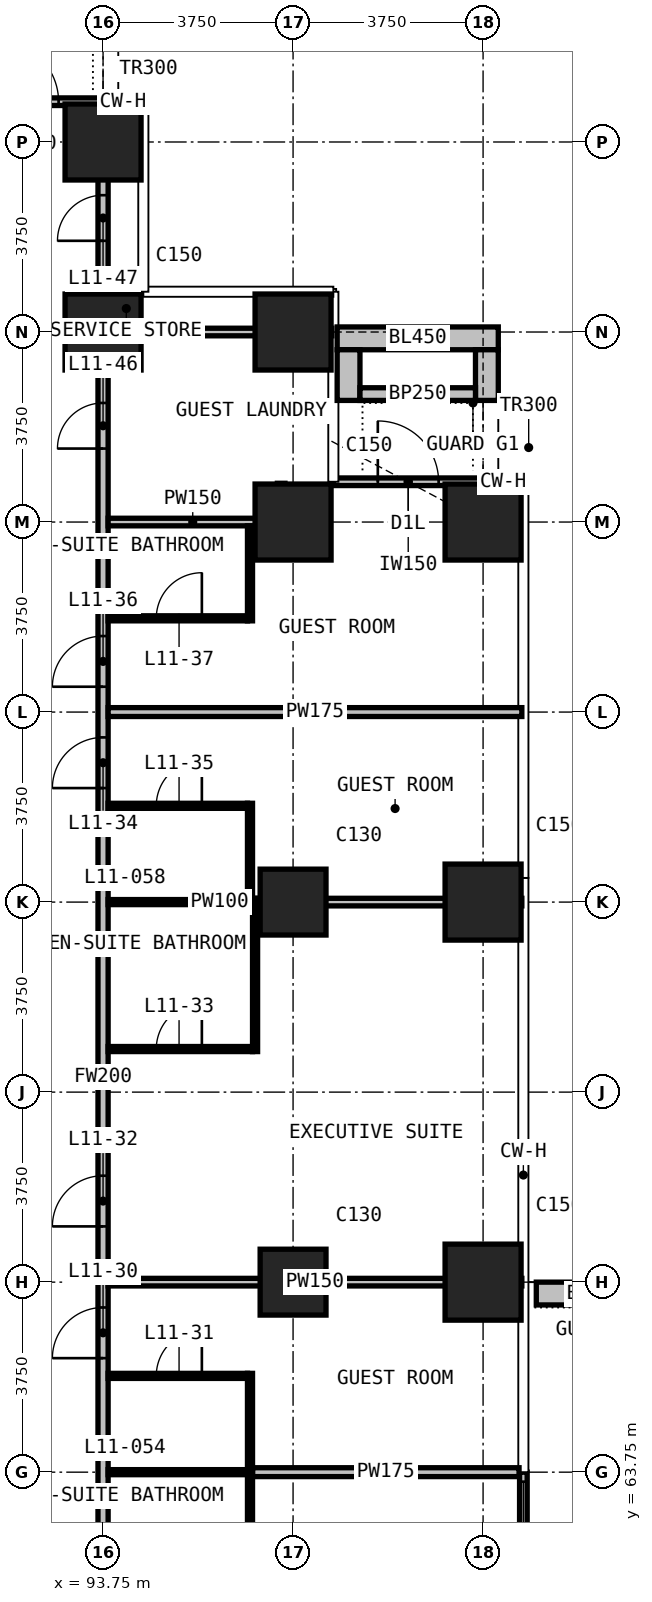
"""IFC4 building model, lengths in metres.
Left out: names, types, materials, properties, quantities, classifications, styles, units other than length and angle.
Written with IfcOpenShell. Run it as: python <this file> out.ifc"""

import sys

from ifc_helpers import new_model, si_unit, direction, frame, frame_2d, origin, origin_2d, place, context, subcontext, project, spatial, rectangle, extrude, element, fill, save


model = new_model("IFC4")
c1 = context("Model", 3, precision=1e-05, world=origin(), true_north=direction((0.0, 1.0)))
c2 = subcontext(c1, "Body", "Model", "MODEL_VIEW")
j1 = project(units=[si_unit("LENGTHUNIT", "METRE"), si_unit("PLANEANGLEUNIT", "RADIAN")], contexts=[c1])
p1 = place(None, origin())
s1 = spatial("IfcSite", under=j1, at=p1, CompositionType="ELEMENT")
p2 = place(p1, origin())
s2 = spatial("IfcBuilding", under=s1, at=p2, CompositionType="ELEMENT")
p3 = place(p2, frame((0.0, 0.0, 56.0)))
s3 = spatial("IfcBuildingStorey", under=s2, at=p3, CompositionType="ELEMENT", Elevation=56.0)
for number, where, z_axis, x_axis in (
    (1, (93.75, 86.25, 0.0), (0.0, 0.0, 1.0), (1.0, 0.0, 0.0)),
    (2, (93.75, 90.0, 0.0), (0.0, 0.0, 1.0), (1.0, 0.0, 0.0)),
):
    element("IfcColumn", number, at=place(p3, frame(where, z_axis=z_axis, x_axis=x_axis)), inside=s3, PredefinedType="COLUMN", context=c2, shape_type="SweptSolid", body=[
        extrude(rectangle(XDim=1.5, YDim=1.5, at=origin_2d()), origin(), (0.0, 0.0, 1.0), 3.3),
    ])
for number, where, z_axis, x_axis in (
    (3, (97.5, 67.5, 0.0), (0.0, 0.0, 1.0), (1.0, 0.0, 0.0)),
    (4, (97.5, 75.0, 0.0), (0.0, 0.0, 1.0), (1.0, 0.0, 0.0)),
):
    element("IfcColumn", number, at=place(p3, frame(where, z_axis=z_axis, x_axis=x_axis)), inside=s3, PredefinedType="COLUMN", context=c2, shape_type="SweptSolid", body=[
        extrude(rectangle(XDim=1.3, YDim=1.3, at=origin_2d()), origin(), (0.0, 0.0, 1.0), 3.3),
    ])
for number, where, z_axis, x_axis in (
    (5, (97.5, 82.5, 0.0), (0.0, 0.0, 1.0), (1.0, 0.0, 0.0)),
    (6, (97.5, 86.25, 0.0), (0.0, 0.0, 1.0), (1.0, 0.0, 0.0)),
    (7, (101.25, 67.5, 0.0), (0.0, 0.0, 1.0), (1.0, 0.0, 0.0)),
    (8, (101.25, 75.0, 0.0), (0.0, 0.0, 1.0), (1.0, 0.0, 0.0)),
    (9, (101.25, 82.5, 0.0), (0.0, 0.0, 1.0), (1.0, 0.0, 0.0)),
):
    element("IfcColumn", number, at=place(p3, frame(where, z_axis=z_axis, x_axis=x_axis)), inside=s3, PredefinedType="COLUMN", context=c2, shape_type="SweptSolid", body=[
        extrude(rectangle(XDim=1.5, YDim=1.5, at=origin_2d()), origin(), (0.0, 0.0, 1.0), 3.3),
    ])
p4 = place(p3, frame((102.045, 60.0, 0.0), z_axis=(0.0, 0.0, 1.0), x_axis=(0.0, 1.0, 0.0)))
e10 = element("IfcWall", 10, at=p4, inside=s3, PredefinedType="SOLIDWALL", context=c2, shape_type="SweptSolid", body=[
    extrude(rectangle(XDim=3.75, YDim=0.15, at=frame_2d((1.875, 0.0))), origin(), (0.0, 0.0, 1.0), 3.0),
])
p5 = place(p4, frame((1.275, 0.0, 0.0)))
e11 = element("IfcOpeningElement", 11, at=p5, cuts=e10, PredefinedType="OPENING", context=c2, shape_type="SweptSolid", body=[
    extrude(rectangle(XDim=1.2, YDim=2.4, at=frame_2d((0.6, 1.2))), frame((0.0, 0.085, 0.0), z_axis=(0.0, -1.0, 0.0), x_axis=(1.0, 0.0, 0.0)), (0.0, 0.0, 1.0), 0.17),
])
p6 = place(p4, frame((2.663, 0.0, 0.1)))
e12 = element("IfcOpeningElement", 12, at=p6, cuts=e10, PredefinedType="OPENING", context=c2, shape_type="SweptSolid", body=[
    extrude(rectangle(XDim=0.9, YDim=2.4, at=frame_2d((0.45, 1.2))), frame((0.0, 0.085, 0.0), z_axis=(0.0, -1.0, 0.0), x_axis=(1.0, 0.0, 0.0)), (0.0, 0.0, 1.0), 0.17),
])
p7 = place(p3, frame((98.295, 83.295, 0.0), z_axis=(0.0, 0.0, 1.0), x_axis=(1.0, 0.0, 0.0)))
e13 = element("IfcWall", 13, at=p7, inside=s3, PredefinedType="SOLIDWALL", context=c2, shape_type="SweptSolid", body=[
    extrude(rectangle(XDim=2.955, YDim=0.15, at=frame_2d((1.478, 0.0))), origin(), (0.0, 0.0, 1.0), 3.0),
])
p8 = place(p7, frame((0.877, 0.0, 0.0)))
e14 = element("IfcOpeningElement", 14, at=p8, cuts=e13, PredefinedType="OPENING", context=c2, shape_type="SweptSolid", body=[
    extrude(rectangle(XDim=1.2, YDim=2.0, at=frame_2d((0.6, 1.0))), frame((0.0, 0.085, 0.0), z_axis=(0.0, -1.0, 0.0), x_axis=(1.0, 0.0, 0.0)), (0.0, 0.0, 1.0), 0.17),
])
p9 = place(p3, frame((90.795, 90.795, 0.0), z_axis=(0.0, 0.0, 1.0), x_axis=(1.0, 0.0, 0.0)))
e15 = element("IfcWall", 15, at=p9, inside=s3, PredefinedType="SOLIDWALL", context=c2, shape_type="SweptSolid", body=[
    extrude(rectangle(XDim=2.955, YDim=0.15, at=frame_2d((1.478, 0.0))), origin(), (0.0, 0.0, 1.0), 3.0),
])
p10 = place(p9, frame((0.877, 0.0, 0.0)))
e16 = element("IfcOpeningElement", 16, at=p10, cuts=e15, PredefinedType="OPENING", context=c2, shape_type="SweptSolid", body=[
    extrude(rectangle(XDim=1.2, YDim=2.4, at=frame_2d((0.6, 1.2))), frame((0.0, 0.085, 0.0), z_axis=(0.0, -1.0, 0.0), x_axis=(1.0, 0.0, 0.0)), (0.0, 0.0, 1.0), 0.17),
])
p11 = place(p3, frame((102.3, 67.275, 0.0), z_axis=(0.0, 0.0, 1.0), x_axis=(1.0, 0.0, 0.0)))
e17 = element("IfcWall", 17, at=p11, inside=s3, PredefinedType="USERDEFINED", context=c2, shape_type="SweptSolid", body=[
    extrude(rectangle(XDim=2.35, YDim=0.45, at=frame_2d((1.175, 0.0))), origin(), (0.0, 0.0, 1.0), 1.1),
])
p12 = place(p3, frame((98.37, 86.125, 0.0), z_axis=(0.0, 0.0, 1.0), x_axis=(1.0, 0.0, 0.0)))
e18 = element("IfcWall", 18, at=p12, inside=s3, PredefinedType="USERDEFINED", context=c2, shape_type="SweptSolid", body=[
    extrude(rectangle(XDim=3.18, YDim=0.45, at=frame_2d((1.59, 0.0))), origin(), (0.0, 0.0, 1.0), 1.1),
])
for number, where, z_axis, x_axis in (
    (19, (98.595, 84.9, 0.0), (0.0, 0.0, 1.0), (0.0, 1.0, 0.0)),
    (20, (101.325, 84.9, 0.0), (0.0, 0.0, 1.0), (0.0, 1.0, 0.0)),
):
    element("IfcWall", number, at=place(p3, frame(where, z_axis=z_axis, x_axis=x_axis)), inside=s3, PredefinedType="USERDEFINED", context=c2, shape_type="SweptSolid", body=[
        extrude(rectangle(XDim=1.0, YDim=0.45, at=frame_2d((0.5, 0.0))), origin(), (0.0, 0.0, 1.0), 1.1),
    ])
p13 = place(p3, frame((98.82, 85.025, 0.0), z_axis=(0.0, 0.0, 1.0), x_axis=(1.0, 0.0, 0.0)))
e21 = element("IfcWall", 21, at=p13, inside=s3, PredefinedType="USERDEFINED", context=c2, shape_type="SweptSolid", body=[
    extrude(rectangle(XDim=2.28, YDim=0.25, at=frame_2d((1.14, 0.0))), origin(), (0.0, 0.0, 1.0), 1.0),
])
p14 = place(p3, frame((93.75, 52.4, 0.0), z_axis=(0.0, 0.0, 1.0), x_axis=(0.0, 1.0, 0.0)))
e22 = element("IfcWall", 22, at=p14, inside=s3, PredefinedType="PARTITIONING", context=c2, shape_type="SweptSolid", body=[
    extrude(rectangle(XDim=38.31, YDim=0.2, at=frame_2d((19.155, 0.0))), origin(), (0.0, 0.0, 1.0), 3.0),
])
p15 = place(p14, frame((5.5, 0.0, 0.0)))
e23 = element("IfcOpeningElement", 23, at=p15, cuts=e22, PredefinedType="OPENING", context=c2, shape_type="SweptSolid", body=[
    extrude(rectangle(XDim=1.0, YDim=2.2, at=frame_2d((0.5, 1.1))), frame((0.0, 0.11, 0.0), z_axis=(0.0, -1.0, 0.0), x_axis=(1.0, 0.0, 0.0)), (0.0, 0.0, 1.0), 0.22),
])
p16 = place(p14, frame((8.1, 0.0, 0.0)))
e24 = element("IfcOpeningElement", 24, at=p16, cuts=e22, PredefinedType="OPENING", context=c2, shape_type="SweptSolid", body=[
    extrude(rectangle(XDim=1.0, YDim=2.2, at=frame_2d((0.5, 1.1))), frame((0.0, 0.11, 0.0), z_axis=(0.0, -1.0, 0.0), x_axis=(1.0, 0.0, 0.0)), (0.0, 0.0, 1.0), 0.22),
])
p17 = place(p14, frame((13.6, 0.0, 0.0)))
e25 = element("IfcOpeningElement", 25, at=p17, cuts=e22, PredefinedType="OPENING", context=c2, shape_type="SweptSolid", body=[
    extrude(rectangle(XDim=1.0, YDim=2.2, at=frame_2d((0.5, 1.1))), frame((0.0, 0.11, 0.0), z_axis=(0.0, -1.0, 0.0), x_axis=(1.0, 0.0, 0.0)), (0.0, 0.0, 1.0), 0.22),
])
p18 = place(p14, frame((16.2, 0.0, 0.0)))
e26 = element("IfcOpeningElement", 26, at=p18, cuts=e22, PredefinedType="OPENING", context=c2, shape_type="SweptSolid", body=[
    extrude(rectangle(XDim=1.0, YDim=2.2, at=frame_2d((0.5, 1.1))), frame((0.0, 0.11, 0.0), z_axis=(0.0, -1.0, 0.0), x_axis=(1.0, 0.0, 0.0)), (0.0, 0.0, 1.0), 0.22),
])
p19 = place(p14, frame((24.85, 0.0, 0.0)))
e27 = element("IfcOpeningElement", 27, at=p19, cuts=e22, PredefinedType="OPENING", context=c2, shape_type="SweptSolid", body=[
    extrude(rectangle(XDim=1.0, YDim=2.2, at=frame_2d((0.5, 1.1))), frame((0.0, 0.11, 0.0), z_axis=(0.0, -1.0, 0.0), x_axis=(1.0, 0.0, 0.0)), (0.0, 0.0, 1.0), 0.22),
])
p20 = place(p14, frame((26.85, 0.0, 0.0)))
e28 = element("IfcOpeningElement", 28, at=p20, cuts=e22, PredefinedType="OPENING", context=c2, shape_type="SweptSolid", body=[
    extrude(rectangle(XDim=1.0, YDim=2.2, at=frame_2d((0.5, 1.1))), frame((0.0, 0.11, 0.0), z_axis=(0.0, -1.0, 0.0), x_axis=(1.0, 0.0, 0.0)), (0.0, 0.0, 1.0), 0.22),
])
p21 = place(p14, frame((31.55, 0.0, 0.0)))
e29 = element("IfcOpeningElement", 29, at=p21, cuts=e22, PredefinedType="OPENING", context=c2, shape_type="SweptSolid", body=[
    extrude(rectangle(XDim=0.9, YDim=2.2, at=frame_2d((0.45, 1.1))), frame((0.0, 0.11, 0.0), z_axis=(0.0, -1.0, 0.0), x_axis=(1.0, 0.0, 0.0)), (0.0, 0.0, 1.0), 0.22),
])
p22 = place(p14, frame((35.65, 0.0, 0.0)))
e30 = element("IfcOpeningElement", 30, at=p22, cuts=e22, PredefinedType="OPENING", context=c2, shape_type="SweptSolid", body=[
    extrude(rectangle(XDim=0.9, YDim=2.2, at=frame_2d((0.45, 1.1))), frame((0.0, 0.11, 0.0), z_axis=(0.0, -1.0, 0.0), x_axis=(1.0, 0.0, 0.0)), (0.0, 0.0, 1.0), 0.22),
])
p23 = place(p3, frame((96.7, 63.75, 0.0), z_axis=(0.0, 0.0, 1.0), x_axis=(1.0, 0.0, 0.0)))
e31 = element("IfcWall", 31, at=p23, inside=s3, PredefinedType="PARTITIONING", context=c2, shape_type="SweptSolid", body=[
    extrude(rectangle(XDim=5.26, YDim=0.175, at=frame_2d((2.63, 0.0))), origin(), (0.0, 0.0, 1.0), 3.0),
])
p24 = place(p3, frame((93.85, 78.75, 0.0), z_axis=(0.0, 0.0, 1.0), x_axis=(1.0, 0.0, 0.0)))
e32 = element("IfcWall", 32, at=p24, inside=s3, PredefinedType="PARTITIONING", context=c2, shape_type="SweptSolid", body=[
    extrude(rectangle(XDim=8.165, YDim=0.175, at=frame_2d((4.083, 0.0))), origin(), (0.0, 0.0, 1.0), 3.0),
])
p25 = place(p3, frame((93.85, 67.5, 0.0), z_axis=(0.0, 0.0, 1.0), x_axis=(1.0, 0.0, 0.0)))
e33 = element("IfcWall", 33, at=p25, inside=s3, PredefinedType="PARTITIONING", context=c2, shape_type="SweptSolid", body=[
    extrude(rectangle(XDim=8.165, YDim=0.15, at=frame_2d((4.083, 0.0))), origin(), (0.0, 0.0, 1.0), 3.0),
])
p26 = place(p3, frame((96.8, 75.0, 0.0), z_axis=(0.0, 0.0, 1.0), x_axis=(1.0, 0.0, 0.0)))
e34 = element("IfcWall", 34, at=p26, inside=s3, PredefinedType="PARTITIONING", context=c2, shape_type="SweptSolid", body=[
    extrude(rectangle(XDim=5.215, YDim=0.15, at=frame_2d((2.607, 0.0))), origin(), (0.0, 0.0, 1.0), 3.0),
])
p27 = place(p3, frame((93.85, 82.5, 0.0), z_axis=(0.0, 0.0, 1.0), x_axis=(1.0, 0.0, 0.0)))
e35 = element("IfcWall", 35, at=p27, inside=s3, PredefinedType="PARTITIONING", context=c2, shape_type="SweptSolid", body=[
    extrude(rectangle(XDim=3.34, YDim=0.15, at=frame_2d((1.67, 0.0))), origin(), (0.0, 0.0, 1.0), 3.0),
])
p28 = place(p3, frame((93.85, 86.25, 0.0), z_axis=(0.0, 0.0, 1.0), x_axis=(1.0, 0.0, 0.0)))
e36 = element("IfcWall", 36, at=p28, inside=s3, PredefinedType="PARTITIONING", context=c2, shape_type="SweptSolid", body=[
    extrude(rectangle(XDim=4.415, YDim=0.15, at=frame_2d((2.208, 0.0))), origin(), (0.0, 0.0, 1.0), 3.0),
])
p29 = place(p3, frame((97.265, 82.425, 0.0), z_axis=(0.0, 0.0, 1.0), x_axis=(0.0, 1.0, 0.0)))
e37 = element("IfcWall", 37, at=p29, inside=s3, PredefinedType="PARTITIONING", context=c2, shape_type="SweptSolid", body=[
    extrude(rectangle(XDim=0.84, YDim=0.15, at=frame_2d((0.42, 0.0))), origin(), (0.0, 0.0, 1.0), 3.0),
])
p30 = place(p3, frame((93.85, 63.75, 0.0), z_axis=(0.0, 0.0, 1.0), x_axis=(1.0, 0.0, 0.0)))
e38 = element("IfcWall", 38, at=p30, inside=s3, PredefinedType="PARTITIONING", context=c2, shape_type="SweptSolid", body=[
    extrude(rectangle(XDim=2.75, YDim=0.1, at=frame_2d((1.375, 0.0))), origin(), (0.0, 0.0, 1.0), 3.0),
])
p31 = place(p3, frame((93.85, 65.65, 0.0), z_axis=(0.0, 0.0, 1.0), x_axis=(1.0, 0.0, 0.0)))
e39 = element("IfcWall", 39, at=p31, inside=s3, PredefinedType="PARTITIONING", context=c2, shape_type="SweptSolid", body=[
    extrude(rectangle(XDim=2.75, YDim=0.1, at=frame_2d((1.375, 0.0))), origin(), (0.0, 0.0, 1.0), 3.0),
])
p32 = place(p31, frame((0.95, 0.0, 0.0)))
e40 = element("IfcOpeningElement", 40, at=p32, cuts=e39, PredefinedType="OPENING", context=c2, shape_type="SweptSolid", body=[
    extrude(rectangle(XDim=0.9, YDim=2.2, at=frame_2d((0.45, 1.1))), frame((0.0, 0.06, 0.0), z_axis=(0.0, -1.0, 0.0), x_axis=(1.0, 0.0, 0.0)), (0.0, 0.0, 1.0), 0.12),
])
p33 = place(p3, frame((93.85, 72.1, 0.0), z_axis=(0.0, 0.0, 1.0), x_axis=(1.0, 0.0, 0.0)))
e41 = element("IfcWall", 41, at=p33, inside=s3, PredefinedType="PARTITIONING", context=c2, shape_type="SweptSolid", body=[
    extrude(rectangle(XDim=2.85, YDim=0.1, at=frame_2d((1.425, 0.0))), origin(), (0.0, 0.0, 1.0), 3.0),
])
p34 = place(p33, frame((0.95, 0.0, 0.0)))
e42 = element("IfcOpeningElement", 42, at=p34, cuts=e41, PredefinedType="OPENING", context=c2, shape_type="SweptSolid", body=[
    extrude(rectangle(XDim=0.9, YDim=2.2, at=frame_2d((0.45, 1.1))), frame((0.0, 0.06, 0.0), z_axis=(0.0, -1.0, 0.0), x_axis=(1.0, 0.0, 0.0)), (0.0, 0.0, 1.0), 0.12),
])
p35 = place(p3, frame((93.85, 75.0, 0.0), z_axis=(0.0, 0.0, 1.0), x_axis=(1.0, 0.0, 0.0)))
e43 = element("IfcWall", 43, at=p35, inside=s3, PredefinedType="PARTITIONING", context=c2, shape_type="SweptSolid", body=[
    extrude(rectangle(XDim=2.75, YDim=0.1, at=frame_2d((1.375, 0.0))), origin(), (0.0, 0.0, 1.0), 3.0),
])
p36 = place(p3, frame((93.85, 76.9, 0.0), z_axis=(0.0, 0.0, 1.0), x_axis=(1.0, 0.0, 0.0)))
e44 = element("IfcWall", 44, at=p36, inside=s3, PredefinedType="PARTITIONING", context=c2, shape_type="SweptSolid", body=[
    extrude(rectangle(XDim=2.75, YDim=0.1, at=frame_2d((1.375, 0.0))), origin(), (0.0, 0.0, 1.0), 3.0),
])
p37 = place(p36, frame((0.95, 0.0, 0.0)))
e45 = element("IfcOpeningElement", 45, at=p37, cuts=e44, PredefinedType="OPENING", context=c2, shape_type="SweptSolid", body=[
    extrude(rectangle(XDim=0.9, YDim=2.2, at=frame_2d((0.45, 1.1))), frame((0.0, 0.06, 0.0), z_axis=(0.0, -1.0, 0.0), x_axis=(1.0, 0.0, 0.0)), (0.0, 0.0, 1.0), 0.12),
])
p38 = place(p3, frame((93.85, 80.6, 0.0), z_axis=(0.0, 0.0, 1.0), x_axis=(1.0, 0.0, 0.0)))
e46 = element("IfcWall", 46, at=p38, inside=s3, PredefinedType="PARTITIONING", context=c2, shape_type="SweptSolid", body=[
    extrude(rectangle(XDim=2.75, YDim=0.1, at=frame_2d((1.375, 0.0))), origin(), (0.0, 0.0, 1.0), 3.0),
])
p39 = place(p38, frame((0.95, 0.0, 0.0)))
e47 = element("IfcOpeningElement", 47, at=p39, cuts=e46, PredefinedType="OPENING", context=c2, shape_type="SweptSolid", body=[
    extrude(rectangle(XDim=0.9, YDim=2.2, at=frame_2d((0.45, 1.1))), frame((0.0, 0.06, 0.0), z_axis=(0.0, -1.0, 0.0), x_axis=(1.0, 0.0, 0.0)), (0.0, 0.0, 1.0), 0.12),
])
p40 = place(p3, frame((96.65, 61.8, 0.0), z_axis=(0.0, 0.0, 1.0), x_axis=(0.0, 1.0, 0.0)))
e48 = element("IfcWall", 48, at=p40, inside=s3, PredefinedType="PARTITIONING", context=c2, shape_type="SweptSolid", body=[
    extrude(rectangle(XDim=3.9, YDim=0.1, at=frame_2d((1.95, 0.0))), origin(), (0.0, 0.0, 1.0), 3.0),
])
p41 = place(p3, frame((96.65, 74.95, 0.0), z_axis=(0.0, 0.0, 1.0), x_axis=(0.0, 1.0, 0.0)))
e49 = element("IfcWall", 49, at=p41, inside=s3, PredefinedType="PARTITIONING", context=c2, shape_type="SweptSolid", body=[
    extrude(rectangle(XDim=2.0, YDim=0.1, at=frame_2d((1.0, 0.0))), origin(), (0.0, 0.0, 1.0), 3.0),
])
p42 = place(p3, frame((96.65, 80.55, 0.0), z_axis=(0.0, 0.0, 1.0), x_axis=(0.0, 1.0, 0.0)))
e50 = element("IfcWall", 50, at=p42, inside=s3, PredefinedType="PARTITIONING", context=c2, shape_type="SweptSolid", body=[
    extrude(rectangle(XDim=1.875, YDim=0.1, at=frame_2d((0.938, 0.0))), origin(), (0.0, 0.0, 1.0), 3.0),
])
p43 = place(p3, frame((96.75, 72.05, 0.0), z_axis=(0.0, 0.0, 1.0), x_axis=(0.0, 1.0, 0.0)))
e51 = element("IfcWall", 51, at=p43, inside=s3, PredefinedType="PARTITIONING", context=c2, shape_type="SweptSolid", body=[
    extrude(rectangle(XDim=3.025, YDim=0.1, at=frame_2d((1.512, 0.0))), origin(), (0.0, 0.0, 1.0), 3.0),
])
p44 = place(p6, origin())
e52 = element("IfcWindow", 52, at=p44, inside=s3, PartitioningType="SINGLE_PANEL", PredefinedType="WINDOW", context=c2, shape_type="SweptSolid", body=[
    extrude(rectangle(XDim=0.9, YDim=2.4, at=frame_2d((0.45, 1.2))), frame((0.0, 0.03, 0.0), z_axis=(0.0, -1.0, 0.0), x_axis=(1.0, 0.0, 0.0)), (0.0, 0.0, 1.0), 0.06),
])
fill(e12, e52)
p45 = place(p8, origin())
e53 = element("IfcDoor", 53, at=p45, inside=s3, OperationType="SINGLE_SWING_LEFT", PredefinedType="DOOR", context=c2, shape_type="SweptSolid", body=[
    extrude(rectangle(XDim=1.2, YDim=2.0, at=frame_2d((0.6, 1.0))), frame((0.0, 0.025, 0.0), z_axis=(0.0, -1.0, 0.0), x_axis=(1.0, 0.0, 0.0)), (0.0, 0.0, 1.0), 0.05),
])
fill(e14, e53)
p46 = place(p10, origin())
e54 = element("IfcDoor", 54, at=p46, inside=s3, OperationType="SINGLE_SWING_LEFT", PredefinedType="DOOR", context=c2, shape_type="SweptSolid", body=[
    extrude(rectangle(XDim=1.2, YDim=2.4, at=frame_2d((0.6, 1.2))), frame((0.0, 0.025, 0.0), z_axis=(0.0, -1.0, 0.0), x_axis=(1.0, 0.0, 0.0)), (0.0, 0.0, 1.0), 0.05),
])
fill(e16, e54)
p47 = place(p17, origin())
e55 = element("IfcDoor", 55, at=p47, inside=s3, OperationType="SINGLE_SWING_LEFT", PredefinedType="DOOR", context=c2, shape_type="SweptSolid", body=[
    extrude(rectangle(XDim=1.0, YDim=2.2, at=frame_2d((0.5, 1.1))), frame((0.0, 0.025, 0.0), z_axis=(0.0, -1.0, 0.0), x_axis=(1.0, 0.0, 0.0)), (0.0, 0.0, 1.0), 0.05),
])
fill(e25, e55)
p48 = place(p32, origin())
e56 = element("IfcDoor", 56, at=p48, inside=s3, OperationType="SINGLE_SWING_RIGHT", PredefinedType="DOOR", context=c2, shape_type="SweptSolid", body=[
    extrude(rectangle(XDim=0.9, YDim=2.2, at=frame_2d((0.45, 1.1))), frame((0.0, 0.025, 0.0), z_axis=(0.0, -1.0, 0.0), x_axis=(1.0, 0.0, 0.0)), (0.0, 0.0, 1.0), 0.05),
])
fill(e40, e56)
p49 = place(p18, origin())
e57 = element("IfcDoor", 57, at=p49, inside=s3, OperationType="SINGLE_SWING_LEFT", PredefinedType="DOOR", context=c2, shape_type="SweptSolid", body=[
    extrude(rectangle(XDim=1.0, YDim=2.2, at=frame_2d((0.5, 1.1))), frame((0.0, 0.025, 0.0), z_axis=(0.0, -1.0, 0.0), x_axis=(1.0, 0.0, 0.0)), (0.0, 0.0, 1.0), 0.05),
])
fill(e26, e57)
p50 = place(p34, origin())
e58 = element("IfcDoor", 58, at=p50, inside=s3, OperationType="SINGLE_SWING_RIGHT", PredefinedType="DOOR", context=c2, shape_type="SweptSolid", body=[
    extrude(rectangle(XDim=0.9, YDim=2.2, at=frame_2d((0.45, 1.1))), frame((0.0, 0.025, 0.0), z_axis=(0.0, -1.0, 0.0), x_axis=(1.0, 0.0, 0.0)), (0.0, 0.0, 1.0), 0.05),
])
fill(e42, e58)
p51 = place(p19, origin())
e59 = element("IfcDoor", 59, at=p51, inside=s3, OperationType="SINGLE_SWING_LEFT", PredefinedType="DOOR", context=c2, shape_type="SweptSolid", body=[
    extrude(rectangle(XDim=1.0, YDim=2.2, at=frame_2d((0.5, 1.1))), frame((0.0, 0.025, 0.0), z_axis=(0.0, -1.0, 0.0), x_axis=(1.0, 0.0, 0.0)), (0.0, 0.0, 1.0), 0.05),
])
fill(e27, e59)
p52 = place(p37, origin())
e60 = element("IfcDoor", 60, at=p52, inside=s3, OperationType="SINGLE_SWING_RIGHT", PredefinedType="DOOR", context=c2, shape_type="SweptSolid", body=[
    extrude(rectangle(XDim=0.9, YDim=2.2, at=frame_2d((0.45, 1.1))), frame((0.0, 0.025, 0.0), z_axis=(0.0, -1.0, 0.0), x_axis=(1.0, 0.0, 0.0)), (0.0, 0.0, 1.0), 0.05),
])
fill(e45, e60)
p53 = place(p20, origin())
e61 = element("IfcDoor", 61, at=p53, inside=s3, OperationType="SINGLE_SWING_RIGHT", PredefinedType="DOOR", context=c2, shape_type="SweptSolid", body=[
    extrude(rectangle(XDim=1.0, YDim=2.2, at=frame_2d((0.5, 1.1))), frame((0.0, 0.025, 0.0), z_axis=(0.0, -1.0, 0.0), x_axis=(1.0, 0.0, 0.0)), (0.0, 0.0, 1.0), 0.05),
])
fill(e28, e61)
p54 = place(p39, origin())
e62 = element("IfcDoor", 62, at=p54, inside=s3, OperationType="SINGLE_SWING_RIGHT", PredefinedType="DOOR", context=c2, shape_type="SweptSolid", body=[
    extrude(rectangle(XDim=0.9, YDim=2.2, at=frame_2d((0.45, 1.1))), frame((0.0, 0.025, 0.0), z_axis=(0.0, -1.0, 0.0), x_axis=(1.0, 0.0, 0.0)), (0.0, 0.0, 1.0), 0.05),
])
fill(e47, e62)
p55 = place(p21, origin())
e63 = element("IfcDoor", 63, at=p55, inside=s3, OperationType="SINGLE_SWING_LEFT", PredefinedType="DOOR", context=c2, shape_type="SweptSolid", body=[
    extrude(rectangle(XDim=0.9, YDim=2.2, at=frame_2d((0.45, 1.1))), frame((0.0, 0.025, 0.0), z_axis=(0.0, -1.0, 0.0), x_axis=(1.0, 0.0, 0.0)), (0.0, 0.0, 1.0), 0.05),
])
fill(e29, e63)
p56 = place(p22, origin())
e64 = element("IfcDoor", 64, at=p56, inside=s3, OperationType="SINGLE_SWING_RIGHT", PredefinedType="DOOR", context=c2, shape_type="SweptSolid", body=[
    extrude(rectangle(XDim=0.9, YDim=2.2, at=frame_2d((0.45, 1.1))), frame((0.0, 0.025, 0.0), z_axis=(0.0, -1.0, 0.0), x_axis=(1.0, 0.0, 0.0)), (0.0, 0.0, 1.0), 0.05),
])
fill(e30, e64)
save(model, sys.argv[1])
